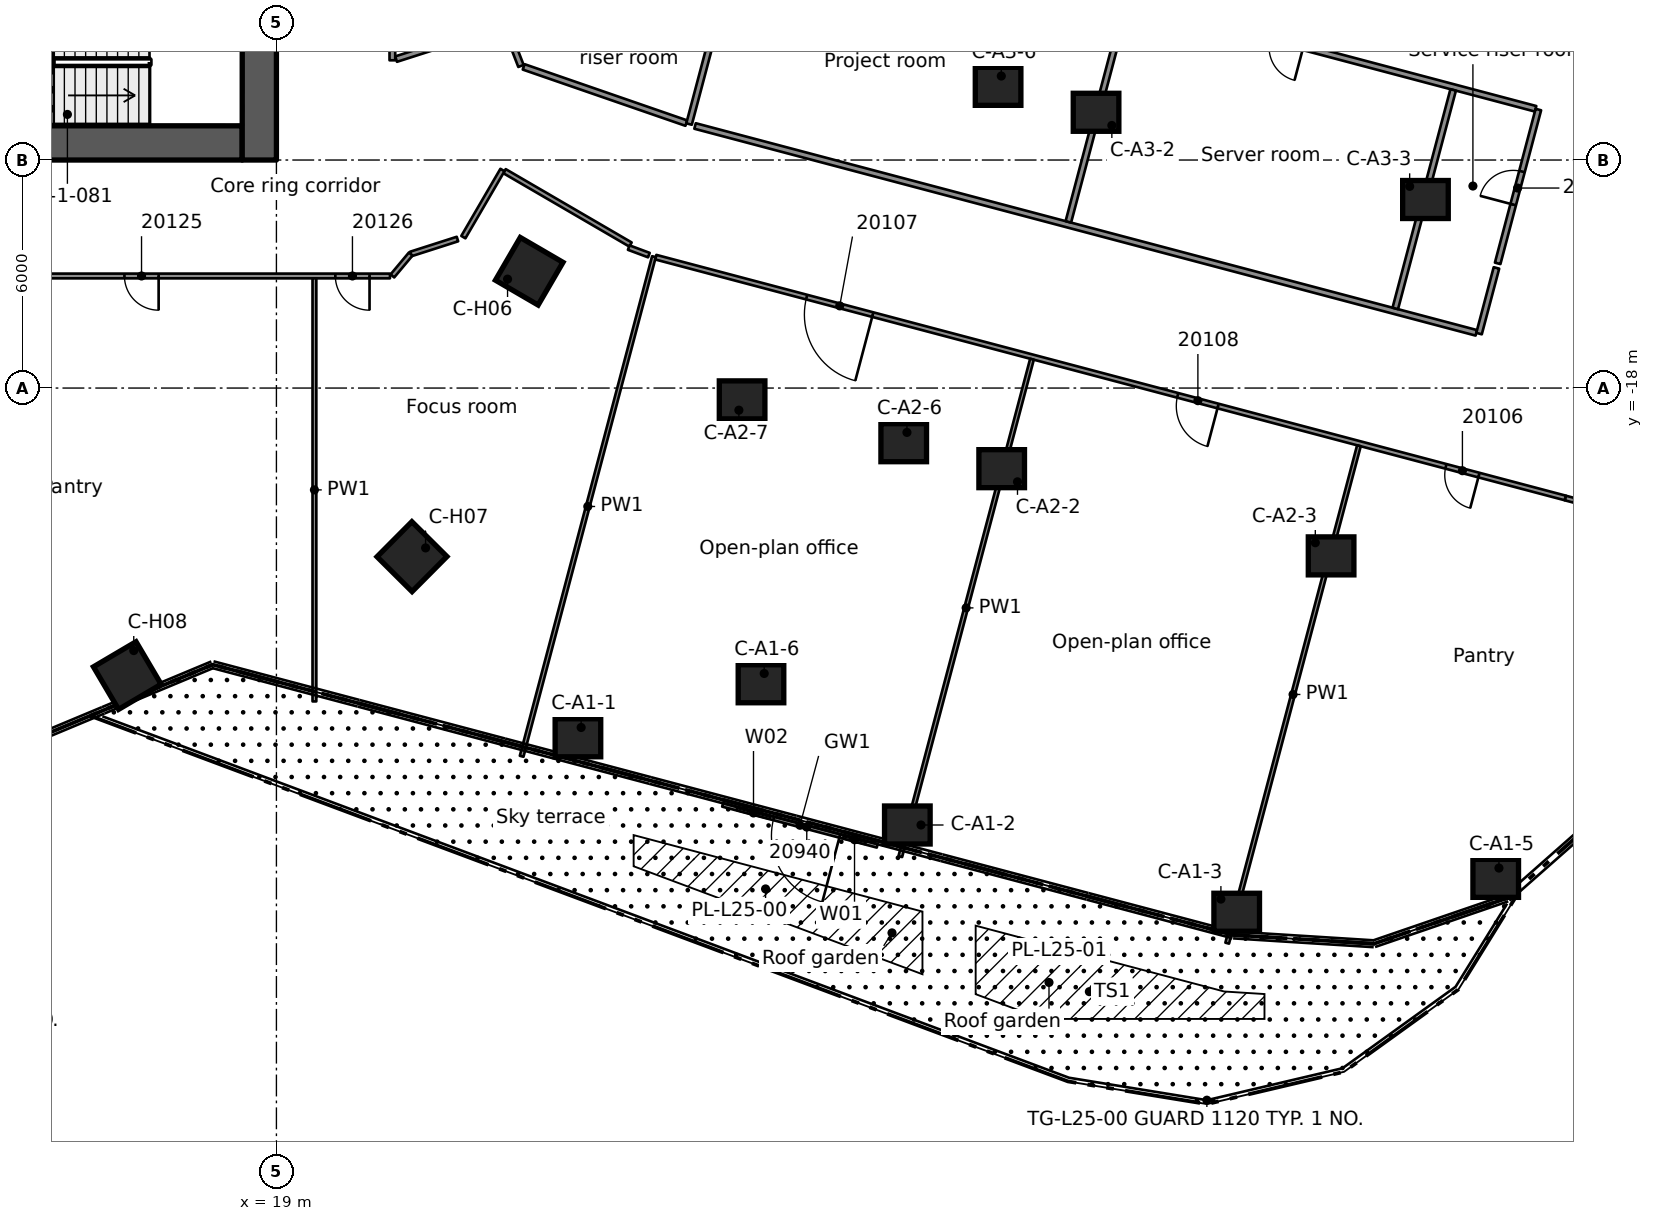
"""IFC4 building model, lengths in metres.
Left out: names, types, materials, properties, quantities, classifications, styles, units other than length and angle.
Written with IfcOpenShell. Run it as: python <this file> out.ifc"""

import sys

from ifc_helpers import new_model, si_unit, direction, frame, frame_2d, origin, origin_2d, place, context, subcontext, project, spatial, rectangle, extrude, element, fill, save


model = new_model("IFC4")
c1 = context("Model", 3, precision=1e-05, world=origin(), true_north=direction((0.0, 1.0)))
c2 = subcontext(c1, "Body", "Model", "MODEL_VIEW")
j1 = project(units=[si_unit("LENGTHUNIT", "METRE"), si_unit("PLANEANGLEUNIT", "RADIAN")], contexts=[c1])
p1 = place(None, origin())
s1 = spatial("IfcSite", under=j1, at=p1, CompositionType="ELEMENT")
p2 = place(p1, origin())
s2 = spatial("IfcBuilding", under=s1, at=p2, CompositionType="ELEMENT")
p3 = place(p2, frame((0.0, 0.0, 102.2)))
s3 = spatial("IfcBuildingStorey", under=s2, at=p3, CompositionType="ELEMENT", Elevation=102.2)
p4 = place(p3, frame((8.9, -11.55, 0.0), z_axis=(0.0, 0.0, 1.0), x_axis=(1.0, 0.0, 0.0)))
e1 = element("IfcWall", 1, at=p4, inside=s3, PredefinedType="SHEAR", context=c2, shape_type="SweptSolid", body=[
    extrude(rectangle(XDim=9.2, YDim=0.9, at=frame_2d((4.6, 0.0))), origin(), (0.0, 0.0, 1.0), 3.5),
])
p5 = place(p4, frame((3.0, 0.0, 0.0)))
e2 = element("IfcOpeningElement", 2, at=p5, cuts=e1, PredefinedType="OPENING", context=c2, shape_type="SweptSolid", body=[
    extrude(rectangle(XDim=1.1, YDim=2.1, at=frame_2d((0.55, 1.05))), frame((0.0, 0.46, 0.0), z_axis=(0.0, -1.0, 0.0), x_axis=(1.0, 0.0, 0.0)), (0.0, 0.0, 1.0), 0.92),
])
p6 = place(p3, frame((18.55, -12.0, 0.0), z_axis=(0.0, 0.0, 1.0), x_axis=(0.0, 1.0, 0.0)))
e3 = element("IfcWall", 3, at=p6, inside=s3, PredefinedType="SHEAR", context=c2, shape_type="SweptSolid", body=[
    extrude(rectangle(XDim=24.0, YDim=0.9, at=frame_2d((12.0, 0.0))), origin(), (0.0, 0.0, 1.0), 3.5),
])
p7 = place(p6, frame((12.1, 0.0, 0.0)))
e4 = element("IfcOpeningElement", 4, at=p7, cuts=e3, PredefinedType="OPENING", context=c2, shape_type="SweptSolid", body=[
    extrude(rectangle(XDim=1.8, YDim=2.1, at=frame_2d((0.9, 1.05))), frame((0.0, 0.46, 0.0), z_axis=(0.0, -1.0, 0.0), x_axis=(1.0, 0.0, 0.0)), (0.0, 0.0, 1.0), 0.92),
])
for number, where, z_axis, x_axis in (
    (5, (26.934, -27.202, 0.0), (0.0, 0.0, 1.0), (1.0, 0.0, 0.0)),
    (6, (35.602, -29.497, 0.0), (0.0, 0.0, 1.0), (1.0, 0.0, 0.0)),
    (7, (44.269, -31.793, 0.0), (0.0, 0.0, 1.0), (1.0, 0.0, 0.0)),
    (8, (51.085, -30.901, 0.0), (0.0, 0.0, 1.0), (1.0, 0.0, 0.0)),
    (9, (31.751, -25.781, 0.0), (0.0, 0.0, 1.0), (1.0, 0.0, 0.0)),
    (10, (38.085, -20.121, 0.0), (0.0, 0.0, 1.0), (1.0, 0.0, 0.0)),
    (11, (46.753, -22.416, 0.0), (0.0, 0.0, 1.0), (1.0, 0.0, 0.0)),
    (12, (35.507, -19.438, 0.0), (0.0, 0.0, 1.0), (1.0, 0.0, 0.0)),
    (13, (31.254, -18.311, 0.0), (0.0, 0.0, 1.0), (1.0, 0.0, 0.0)),
    (14, (40.568, -10.744, 0.0), (0.0, 0.0, 1.0), (1.0, 0.0, 0.0)),
    (15, (49.236, -13.039, 0.0), (0.0, 0.0, 1.0), (1.0, 0.0, 0.0)),
    (16, (37.99, -10.061, 0.0), (0.0, 0.0, 1.0), (1.0, 0.0, 0.0)),
):
    element("IfcColumn", number, at=place(p3, frame(where, z_axis=z_axis, x_axis=x_axis)), inside=s3, PredefinedType="COLUMN", context=c2, shape_type="SweptSolid", body=[
        extrude(rectangle(XDim=1.2, YDim=1.0, at=origin_2d()), origin(), (0.0, 0.0, 1.0), 3.5),
    ])
for number, where, z_axis, x_axis in (
    (17, (25.652, -14.927, 0.0), (0.0, 0.0, 1.0), (0.864, -0.503, 0.0)),
    (18, (22.567, -22.436, 0.0), (0.0, 0.0, 1.0), (0.709, -0.705, 0.0)),
    (19, (15.076, -25.565, 0.0), (0.0, 0.0, 1.0), (0.508, -0.861, 0.0)),
):
    element("IfcColumn", number, at=place(p3, frame(where, z_axis=z_axis, x_axis=x_axis)), inside=s3, PredefinedType="COLUMN", context=c2, shape_type="SweptSolid", body=[
        extrude(rectangle(XDim=1.3, YDim=1.3, at=origin_2d()), origin(), (0.0, 0.0, 1.0), 3.5),
    ])
p8 = place(p3, frame((34.811, -30.043, 0.0), z_axis=(0.0, 0.0, 1.0), x_axis=(-0.966670614425, 0.256023286456, 0.0)))
e20 = element("IfcWall", 20, at=p8, inside=s3, PredefinedType="STANDARD", context=c2, shape_type="SweptSolid", body=[
    extrude(rectangle(XDim=4.209, YDim=0.1, at=frame_2d((2.104, 0.0))), origin(), (0.0, 0.0, 1.0), 3.1),
])
p9 = place(p8, frame((1.019, 0.0, 0.0)))
e21 = element("IfcOpeningElement", 21, at=p9, cuts=e20, PredefinedType="OPENING", context=c2, shape_type="SweptSolid", body=[
    extrude(rectangle(XDim=1.8, YDim=2.4, at=frame_2d((0.9, 1.2))), frame((0.0, 0.06, 0.0), z_axis=(0.0, -1.0, 0.0), x_axis=(1.0, 0.0, 0.0)), (0.0, 0.0, 1.0), 0.12),
])
p10 = place(p8, frame((0.319, 0.0, 0.0)))
e22 = element("IfcOpeningElement", 22, at=p10, cuts=e20, PredefinedType="OPENING", context=c2, shape_type="SweptSolid", body=[
    extrude(rectangle(XDim=0.6, YDim=2.4, at=frame_2d((0.3, 1.2))), frame((0.0, 0.06, 0.0), z_axis=(0.0, -1.0, 0.0), x_axis=(1.0, 0.0, 0.0)), (0.0, 0.0, 1.0), 0.12),
])
p11 = place(p8, frame((2.919, 0.0, 0.0)))
e23 = element("IfcOpeningElement", 23, at=p11, cuts=e20, PredefinedType="OPENING", context=c2, shape_type="SweptSolid", body=[
    extrude(rectangle(XDim=0.9, YDim=2.4, at=frame_2d((0.45, 1.2))), frame((0.0, 0.06, 0.0), z_axis=(0.0, -1.0, 0.0), x_axis=(1.0, 0.0, 0.0)), (0.0, 0.0, 1.0), 0.12),
])
p12 = place(p3, frame((25.002, -12.293, 0.0), z_axis=(0.0, 0.0, 1.0), x_axis=(0.864207961663, -0.503134772201, 0.0)))
e24 = element("IfcWall", 24, at=p12, inside=s3, PredefinedType="PARTITIONING", context=c2, shape_type="SweptSolid", body=[
    extrude(rectangle(XDim=3.836, YDim=0.125, at=frame_2d((1.918, 0.0))), origin(), (0.0, 0.0, 1.0), 3.08),
])
p13 = place(p3, frame((28.271, -14.304, 0.0), z_axis=(0.0, 0.0, 1.0), x_axis=(0.936771746221, -0.34994098857, 0.0)))
e25 = element("IfcWall", 25, at=p13, inside=s3, PredefinedType="PARTITIONING", context=c2, shape_type="SweptSolid", body=[
    extrude(rectangle(XDim=0.566, YDim=0.125, at=frame_2d((0.283, 0.0))), origin(), (0.0, 0.0, 1.0), 3.08),
])
p14 = place(p3, frame((29.787, -11.029, 0.0), z_axis=(0.0, 0.0, 1.0), x_axis=(-0.945116082169, 0.326734741381, 0.0)))
e26 = element("IfcWall", 26, at=p14, inside=s3, PredefinedType="PARTITIONING", context=c2, shape_type="SweptSolid", body=[
    extrude(rectangle(XDim=4.53, YDim=0.15, at=frame_2d((2.265, 0.0))), origin(), (0.0, 0.0, 1.0), 3.08),
])
p15 = place(p3, frame((52.915, -20.893, 0.0), z_axis=(0.0, 0.0, 1.0), x_axis=(0.966598588757, -0.256295080352, 0.0)))
e27 = element("IfcWall", 27, at=p15, inside=s3, PredefinedType="PARTITIONING", context=c2, shape_type="SweptSolid", body=[
    extrude(rectangle(XDim=0.3, YDim=0.125, at=frame_2d((0.15, 0.0))), origin(), (0.0, 0.0, 1.0), 3.08),
])
p16 = place(p3, frame((52.916, -20.892, 0.0), z_axis=(0.0, 0.0, 1.0), x_axis=(-0.966698340064, 0.255918579469, 0.0)))
e28 = element("IfcWall", 28, at=p16, inside=s3, PredefinedType="PARTITIONING", context=c2, shape_type="SweptSolid", body=[
    extrude(rectangle(XDim=24.759, YDim=0.125, at=frame_2d((12.379, 0.0))), origin(), (0.0, 0.0, 1.0), 3.08),
])
p17 = place(p16, frame((2.351, 0.0, 0.0)))
e29 = element("IfcOpeningElement", 29, at=p17, cuts=e28, PredefinedType="OPENING", context=c2, shape_type="SweptSolid", body=[
    extrude(rectangle(XDim=0.9, YDim=2.1, at=frame_2d((0.45, 1.05))), frame((0.0, 0.073, 0.0), z_axis=(0.0, -1.0, 0.0), x_axis=(1.0, 0.0, 0.0)), (0.0, 0.0, 1.0), 0.145),
])
p18 = place(p16, frame((18.851, 0.0, 0.0)))
e30 = element("IfcOpeningElement", 30, at=p18, cuts=e28, PredefinedType="OPENING", context=c2, shape_type="SweptSolid", body=[
    extrude(rectangle(XDim=1.8, YDim=2.1, at=frame_2d((0.9, 1.05))), frame((0.0, 0.073, 0.0), z_axis=(0.0, -1.0, 0.0), x_axis=(1.0, 0.0, 0.0)), (0.0, 0.0, 1.0), 0.145),
])
p19 = place(p16, frame((9.451, 0.0, 0.0)))
e31 = element("IfcOpeningElement", 31, at=p19, cuts=e28, PredefinedType="OPENING", context=c2, shape_type="SweptSolid", body=[
    extrude(rectangle(XDim=1.1, YDim=2.1, at=frame_2d((0.55, 1.05))), frame((0.0, 0.073, 0.0), z_axis=(0.0, -1.0, 0.0), x_axis=(1.0, 0.0, 0.0)), (0.0, 0.0, 1.0), 0.145),
])
p20 = place(p3, frame((30.016, -11.104, 0.0), z_axis=(0.0, 0.0, 1.0), x_axis=(0.966689773776, -0.255950935293, 0.0)))
e32 = element("IfcWall", 32, at=p20, inside=s3, PredefinedType="PARTITIONING", context=c2, shape_type="SweptSolid", body=[
    extrude(rectangle(XDim=21.266, YDim=0.15, at=frame_2d((10.633, 0.0))), origin(), (0.0, 0.0, 1.0), 3.08),
])
p21 = place(p3, frame((52.134, -10.652, 0.0), z_axis=(0.0, 0.0, 1.0), x_axis=(-0.966671200414, 0.25602107392, 0.0)))
e33 = element("IfcWall", 33, at=p21, inside=s3, PredefinedType="PARTITIONING", context=c2, shape_type="SweptSolid", body=[
    extrude(rectangle(XDim=21.147, YDim=0.15, at=frame_2d((10.573, 0.0))), origin(), (0.0, 0.0, 1.0), 3.08),
])
p22 = place(p21, frame((15.724, 0.0, 0.0)))
e34 = element("IfcOpeningElement", 34, at=p22, cuts=e33, PredefinedType="OPENING", context=c2, shape_type="SweptSolid", body=[
    extrude(rectangle(XDim=0.9, YDim=2.1, at=frame_2d((0.45, 1.05))), frame((0.0, 0.085, 0.0), z_axis=(0.0, -1.0, 0.0), x_axis=(1.0, 0.0, 0.0)), (0.0, 0.0, 1.0), 0.17),
])
p23 = place(p21, frame((6.324, 0.0, 0.0)))
e35 = element("IfcOpeningElement", 35, at=p23, cuts=e33, PredefinedType="OPENING", context=c2, shape_type="SweptSolid", body=[
    extrude(rectangle(XDim=0.9, YDim=2.1, at=frame_2d((0.45, 1.05))), frame((0.0, 0.085, 0.0), z_axis=(0.0, -1.0, 0.0), x_axis=(1.0, 0.0, 0.0)), (0.0, 0.0, 1.0), 0.17),
])
p24 = place(p3, frame((21.988, -15.051, 0.0), z_axis=(0.0, 0.0, 1.0), x_axis=(-1.0, 0.0, 0.0)))
e36 = element("IfcWall", 36, at=p24, inside=s3, PredefinedType="PARTITIONING", context=c2, shape_type="SweptSolid", body=[
    extrude(rectangle(XDim=10.997, YDim=0.125, at=frame_2d((5.499, 0.0))), origin(), (0.0, 0.0, 1.0), 3.08),
])
p25 = place(p24, frame((6.087, 0.0, 0.0)))
e37 = element("IfcOpeningElement", 37, at=p25, cuts=e36, PredefinedType="OPENING", context=c2, shape_type="SweptSolid", body=[
    extrude(rectangle(XDim=0.9, YDim=2.1, at=frame_2d((0.45, 1.05))), frame((0.0, 0.073, 0.0), z_axis=(0.0, -1.0, 0.0), x_axis=(1.0, 0.0, 0.0)), (0.0, 0.0, 1.0), 0.145),
])
p26 = place(p24, frame((0.538, 0.0, 0.0)))
e38 = element("IfcOpeningElement", 38, at=p26, cuts=e36, PredefinedType="OPENING", context=c2, shape_type="SweptSolid", body=[
    extrude(rectangle(XDim=0.9, YDim=2.1, at=frame_2d((0.45, 1.05))), frame((0.0, 0.073, 0.0), z_axis=(0.0, -1.0, 0.0), x_axis=(1.0, 0.0, 0.0)), (0.0, 0.0, 1.0), 0.145),
])
p27 = place(p3, frame((22.534, -14.473, 0.0), z_axis=(0.0, 0.0, 1.0), x_axis=(0.952378042639, 0.304919766331, 0.0)))
e39 = element("IfcWall", 39, at=p27, inside=s3, PredefinedType="PARTITIONING", context=c2, shape_type="SweptSolid", body=[
    extrude(rectangle(XDim=1.292, YDim=0.125, at=frame_2d((0.646, 0.0))), origin(), (0.0, 0.0, 1.0), 3.08),
])
p28 = place(p3, frame((22.149, -9.345, 0.0), z_axis=(0.0, 0.0, 1.0), x_axis=(0.952306801054, 0.305142190899, 0.0)))
e40 = element("IfcWall", 40, at=p28, inside=s3, PredefinedType="PARTITIONING", context=c2, shape_type="SweptSolid", body=[
    extrude(rectangle(XDim=2.635, YDim=0.15, at=frame_2d((1.317, 0.0))), origin(), (0.0, 0.0, 1.0), 3.08),
])
p29 = place(p3, frame((23.919, -14.029, 0.0), z_axis=(0.0, 0.0, 1.0), x_axis=(0.503232487024, 0.864151065499, 0.0)))
e41 = element("IfcWall", 41, at=p29, inside=s3, PredefinedType="PARTITIONING", context=c2, shape_type="SweptSolid", body=[
    extrude(rectangle(XDim=2.045, YDim=0.125, at=frame_2d((1.022, 0.0))), origin(), (0.0, 0.0, 1.0), 3.08),
])
p30 = place(p3, frame((25.435, -9.525, 0.0), z_axis=(0.0, 0.0, 1.0), x_axis=(-0.360270423637, 0.932847909282, 0.0)))
e42 = element("IfcWall", 42, at=p30, inside=s3, PredefinedType="PARTITIONING", context=c2, shape_type="SweptSolid", body=[
    extrude(rectangle(XDim=0.899, YDim=0.15, at=frame_2d((0.45, 0.0))), origin(), (0.0, 0.0, 1.0), 3.08),
])
p31 = place(p3, frame((50.646, -16.567, 0.0), z_axis=(0.0, 0.0, 1.0), x_axis=(0.256234173413, 0.966614736271, 0.0)))
e43 = element("IfcWall", 43, at=p31, inside=s3, PredefinedType="PARTITIONING", context=c2, shape_type="SweptSolid", body=[
    extrude(rectangle(XDim=1.787, YDim=0.15, at=frame_2d((0.894, 0.0))), origin(), (0.0, 0.0, 1.0), 3.08),
])
p32 = place(p3, frame((51.136, -14.719, 0.0), z_axis=(0.0, 0.0, 1.0), x_axis=(0.25585088256, 0.966716259247, 0.0)))
e44 = element("IfcWall", 44, at=p32, inside=s3, PredefinedType="PARTITIONING", context=c2, shape_type="SweptSolid", body=[
    extrude(rectangle(XDim=4.186, YDim=0.15, at=frame_2d((2.093, 0.0))), origin(), (0.0, 0.0, 1.0), 3.08),
])
p33 = place(p32, frame((1.6, 0.0, 0.0)))
e45 = element("IfcOpeningElement", 45, at=p33, cuts=e44, PredefinedType="OPENING", context=c2, shape_type="SweptSolid", body=[
    extrude(rectangle(XDim=0.9, YDim=2.1, at=frame_2d((0.45, 1.05))), frame((0.0, 0.085, 0.0), z_axis=(0.0, -1.0, 0.0), x_axis=(1.0, 0.0, 0.0)), (0.0, 0.0, 1.0), 0.17),
])
p34 = place(p3, frame((44.019, -32.606, 0.0), z_axis=(0.0, 0.0, 1.0), x_axis=(0.25602242295, 0.966670843124, 0.0)))
e46 = element("IfcWall", 46, at=p34, inside=s3, PredefinedType="PARTITIONING", context=c2, shape_type="SweptSolid", body=[
    extrude(rectangle(XDim=13.538, YDim=0.1, at=frame_2d((6.769, 0.0))), origin(), (0.0, 0.0, 1.0), 3.08),
])
p35 = place(p3, frame((48.442, -15.905, 0.0), z_axis=(0.0, 0.0, 1.0), x_axis=(0.256111443265, 0.96664726174, 0.0)))
e47 = element("IfcWall", 47, at=p35, inside=s3, PredefinedType="PARTITIONING", context=c2, shape_type="SweptSolid", body=[
    extrude(rectangle(XDim=5.947, YDim=0.15, at=frame_2d((2.974, 0.0))), origin(), (0.0, 0.0, 1.0), 3.08),
])
p36 = place(p3, frame((35.417, -30.328, 0.0), z_axis=(0.0, 0.0, 1.0), x_axis=(0.255955015068, 0.966688693562, 0.0)))
e48 = element("IfcWall", 48, at=p36, inside=s3, PredefinedType="PARTITIONING", context=c2, shape_type="SweptSolid", body=[
    extrude(rectangle(XDim=13.538, YDim=0.1, at=frame_2d((6.769, 0.0))), origin(), (0.0, 0.0, 1.0), 3.08),
])
p37 = place(p3, frame((39.839, -13.627, 0.0), z_axis=(0.0, 0.0, 1.0), x_axis=(0.256032445662, 0.966668188557, 0.0)))
e49 = element("IfcWall", 49, at=p37, inside=s3, PredefinedType="PARTITIONING", context=c2, shape_type="SweptSolid", body=[
    extrude(rectangle(XDim=5.948, YDim=0.15, at=frame_2d((2.974, 0.0))), origin(), (0.0, 0.0, 1.0), 3.08),
])
p38 = place(p3, frame((25.453, -27.689, 0.0), z_axis=(0.0, 0.0, 1.0), x_axis=(0.255987300487, 0.966680144613, 0.0)))
e50 = element("IfcWall", 50, at=p38, inside=s3, PredefinedType="PARTITIONING", context=c2, shape_type="SweptSolid", body=[
    extrude(rectangle(XDim=13.599, YDim=0.1, at=frame_2d((6.8, 0.0))), origin(), (0.0, 0.0, 1.0), 3.08),
])
p39 = place(p3, frame((29.858, -11.053, 0.0), z_axis=(0.0, 0.0, 1.0), x_axis=(0.256179404859, 0.966629252882, 0.0)))
e51 = element("IfcWall", 51, at=p39, inside=s3, PredefinedType="PARTITIONING", context=c2, shape_type="SweptSolid", body=[
    extrude(rectangle(XDim=6.035, YDim=0.15, at=frame_2d((3.018, 0.0))), origin(), (0.0, 0.0, 1.0), 3.08),
])
p40 = place(p3, frame((22.051, -15.05, 0.0), z_axis=(0.0, 0.0, 1.0), x_axis=(0.641714843871, 0.766943321997, 0.0)))
e52 = element("IfcWall", 52, at=p40, inside=s3, PredefinedType="PARTITIONING", context=c2, shape_type="SweptSolid", body=[
    extrude(rectangle(XDim=0.752, YDim=0.125, at=frame_2d((0.376, 0.0))), origin(), (0.0, 0.0, 1.0), 3.08),
])
p41 = place(p3, frame((22.051, -5.788, 0.0), z_axis=(0.0, 0.0, 1.0), x_axis=(0.0, -1.0, 0.0)))
e53 = element("IfcWall", 53, at=p41, inside=s3, PredefinedType="PARTITIONING", context=c2, shape_type="SweptSolid", body=[
    extrude(rectangle(XDim=3.588, YDim=0.15, at=frame_2d((1.794, 0.0))), origin(), (0.0, 0.0, 1.0), 3.08),
])
p42 = place(p41, frame((1.35, 0.0, 0.0)))
e54 = element("IfcOpeningElement", 54, at=p42, cuts=e53, PredefinedType="OPENING", context=c2, shape_type="SweptSolid", body=[
    extrude(rectangle(XDim=0.9, YDim=2.1, at=frame_2d((0.45, 1.05))), frame((0.0, 0.085, 0.0), z_axis=(0.0, -1.0, 0.0), x_axis=(1.0, 0.0, 0.0)), (0.0, 0.0, 1.0), 0.17),
])
p43 = place(p3, frame((20.0, -26.245, 0.0), z_axis=(0.0, 0.0, 1.0), x_axis=(0.0, 1.0, 0.0)))
e55 = element("IfcWall", 55, at=p43, inside=s3, PredefinedType="PARTITIONING", context=c2, shape_type="SweptSolid", body=[
    extrude(rectangle(XDim=11.131, YDim=0.1, at=frame_2d((5.565, 0.0))), origin(), (0.0, 0.0, 1.0), 3.08),
])
p44 = place(p9, origin())
e56 = element("IfcDoor", 56, at=p44, inside=s3, OperationType="DOUBLE_DOOR_SINGLE_SWING", PredefinedType="DOOR", context=c2, shape_type="SweptSolid", body=[
    extrude(rectangle(XDim=1.8, YDim=2.4, at=frame_2d((0.9, 1.2))), frame((0.0, 0.025, 0.0), z_axis=(0.0, -1.0, 0.0), x_axis=(1.0, 0.0, 0.0)), (0.0, 0.0, 1.0), 0.05),
])
fill(e21, e56)
p45 = place(p10, origin())
e57 = element("IfcWindow", 57, at=p45, inside=s3, PartitioningType="SINGLE_PANEL", PredefinedType="WINDOW", context=c2, shape_type="SweptSolid", body=[
    extrude(rectangle(XDim=0.6, YDim=2.4, at=frame_2d((0.3, 1.2))), frame((0.0, 0.03, 0.0), z_axis=(0.0, -1.0, 0.0), x_axis=(1.0, 0.0, 0.0)), (0.0, 0.0, 1.0), 0.06),
])
fill(e22, e57)
p46 = place(p11, origin())
e58 = element("IfcWindow", 58, at=p46, inside=s3, PartitioningType="SINGLE_PANEL", PredefinedType="WINDOW", context=c2, shape_type="SweptSolid", body=[
    extrude(rectangle(XDim=0.9, YDim=2.4, at=frame_2d((0.45, 1.2))), frame((0.0, 0.03, 0.0), z_axis=(0.0, -1.0, 0.0), x_axis=(1.0, 0.0, 0.0)), (0.0, 0.0, 1.0), 0.06),
])
fill(e23, e58)
p47 = place(p33, origin())
e59 = element("IfcDoor", 59, at=p47, inside=s3, OperationType="SINGLE_SWING_LEFT", PredefinedType="DOOR", context=c2, shape_type="SweptSolid", body=[
    extrude(rectangle(XDim=0.9, YDim=2.1, at=frame_2d((0.45, 1.05))), frame((0.0, 0.025, 0.0), z_axis=(0.0, -1.0, 0.0), x_axis=(1.0, 0.0, 0.0)), (0.0, 0.0, 1.0), 0.05),
])
fill(e45, e59)
p48 = place(p17, origin())
e60 = element("IfcDoor", 60, at=p48, inside=s3, OperationType="SINGLE_SWING_LEFT", PredefinedType="DOOR", context=c2, shape_type="SweptSolid", body=[
    extrude(rectangle(XDim=0.9, YDim=2.1, at=frame_2d((0.45, 1.05))), frame((0.0, 0.025, 0.0), z_axis=(0.0, -1.0, 0.0), x_axis=(1.0, 0.0, 0.0)), (0.0, 0.0, 1.0), 0.05),
])
fill(e29, e60)
p49 = place(p18, origin())
e61 = element("IfcDoor", 61, at=p49, inside=s3, OperationType="DOUBLE_DOOR_SINGLE_SWING", PredefinedType="DOOR", context=c2, shape_type="SweptSolid", body=[
    extrude(rectangle(XDim=1.8, YDim=2.1, at=frame_2d((0.9, 1.05))), frame((0.0, 0.025, 0.0), z_axis=(0.0, -1.0, 0.0), x_axis=(1.0, 0.0, 0.0)), (0.0, 0.0, 1.0), 0.05),
])
fill(e30, e61)
p50 = place(p19, origin())
e62 = element("IfcDoor", 62, at=p50, inside=s3, OperationType="SINGLE_SWING_LEFT", PredefinedType="DOOR", context=c2, shape_type="SweptSolid", body=[
    extrude(rectangle(XDim=1.1, YDim=2.1, at=frame_2d((0.55, 1.05))), frame((0.0, 0.025, 0.0), z_axis=(0.0, -1.0, 0.0), x_axis=(1.0, 0.0, 0.0)), (0.0, 0.0, 1.0), 0.05),
])
fill(e31, e62)
p51 = place(p25, origin())
e63 = element("IfcDoor", 63, at=p51, inside=s3, OperationType="SINGLE_SWING_RIGHT", PredefinedType="DOOR", context=c2, shape_type="SweptSolid", body=[
    extrude(rectangle(XDim=0.9, YDim=2.1, at=frame_2d((0.45, 1.05))), frame((0.0, 0.025, 0.0), z_axis=(0.0, -1.0, 0.0), x_axis=(1.0, 0.0, 0.0)), (0.0, 0.0, 1.0), 0.05),
])
fill(e37, e63)
p52 = place(p26, origin())
e64 = element("IfcDoor", 64, at=p52, inside=s3, OperationType="SINGLE_SWING_LEFT", PredefinedType="DOOR", context=c2, shape_type="SweptSolid", body=[
    extrude(rectangle(XDim=0.9, YDim=2.1, at=frame_2d((0.45, 1.05))), frame((0.0, 0.025, 0.0), z_axis=(0.0, -1.0, 0.0), x_axis=(1.0, 0.0, 0.0)), (0.0, 0.0, 1.0), 0.05),
])
fill(e38, e64)
save(model, sys.argv[1])
